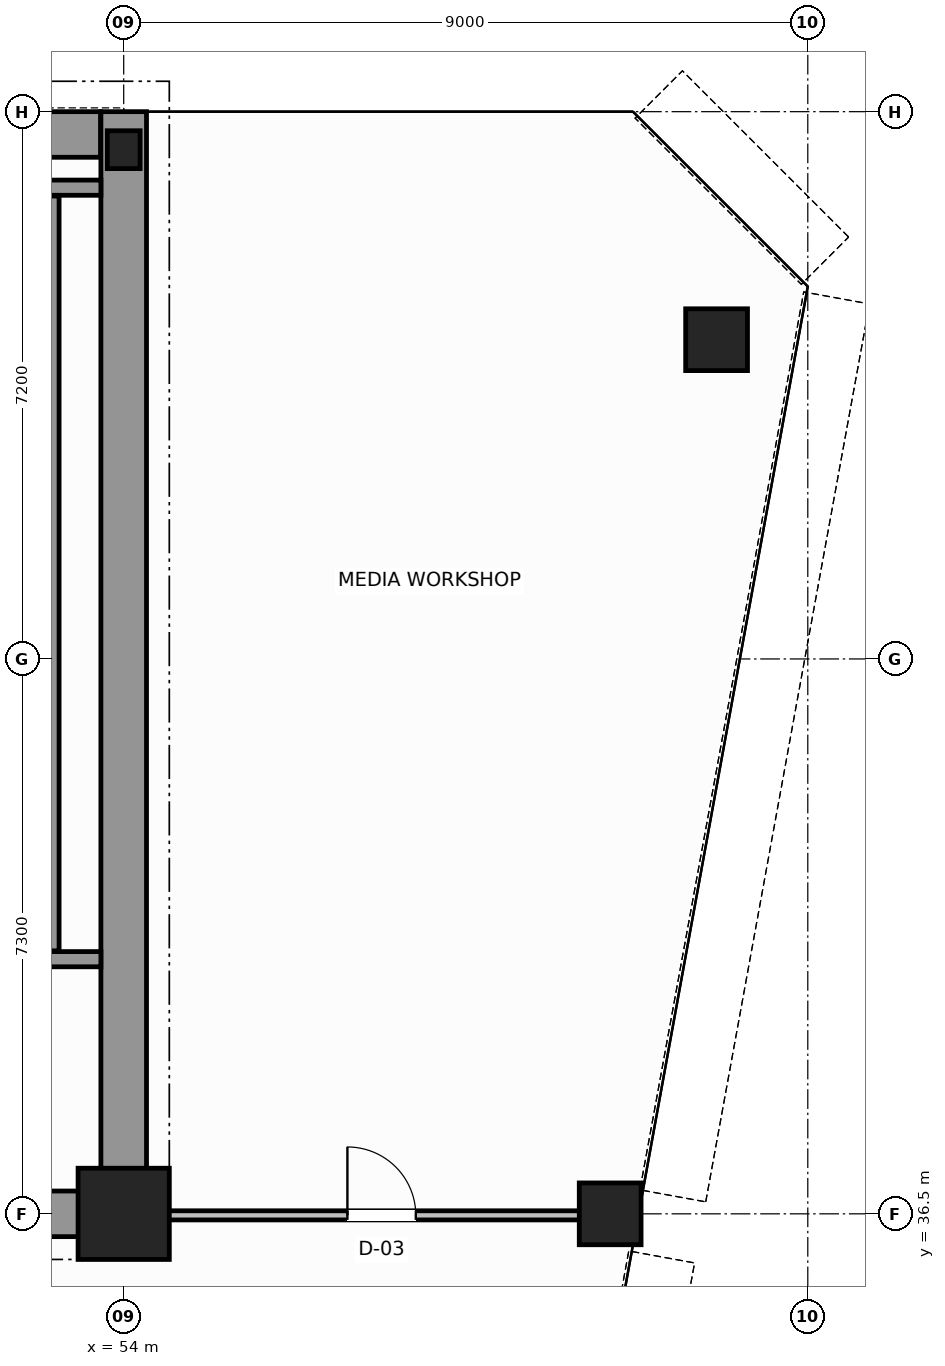
"""IFC4 building model, lengths in metres.
Left out: names, types, materials, properties, quantities, classifications, styles, units other than length and angle.
Written with IfcOpenShell. Run it as: python <this file> out.ifc"""

import sys

from ifc_helpers import new_model, si_unit, direction, frame, frame_2d, origin, origin_2d, place, context, subcontext, project, spatial, rectangle, hollow_circle, i_section, extrude, source, transform, mapped, element, fill, save


model = new_model("IFC4")
c1 = context("Model", 3, precision=1e-05, world=origin(), true_north=direction((0.0, 1.0)))
c2 = subcontext(c1, "Body", "Model", "MODEL_VIEW")
j1 = project(units=[si_unit("LENGTHUNIT", "METRE"), si_unit("PLANEANGLEUNIT", "RADIAN")], contexts=[c1])
p1 = place(None, origin())
s1 = spatial("IfcSite", under=j1, at=p1, CompositionType="ELEMENT")
p2 = place(p1, origin())
s2 = spatial("IfcBuilding", under=s1, at=p2, CompositionType="ELEMENT")
p3 = place(p2, frame((0.0, 0.0, 176.6)))
s3 = spatial("IfcBuildingStorey", under=s2, at=p3, CompositionType="ELEMENT", Elevation=176.6)
m1 = source(origin(), c2, "Body", "SweptSolid", [
    extrude(rectangle(XDim=1.2, YDim=1.2, at=origin_2d()), origin(), (0.0, 0.0, 1.0), 3.8),
])
p4 = place(p3, frame((54.0, 36.5, 0.0), z_axis=(0.0, 0.0, 1.0), x_axis=(1.0, 0.0, 0.0)))
e1 = element("IfcColumn", 1, at=p4, inside=s3, PredefinedType="COLUMN", context=c2, shape_type="MappedRepresentation", body=[
    mapped(m1, transform((0.0, 0.0, 0.0), scale=1.0)),
])
m2 = source(origin(), c2, "Body", "SweptSolid", [
    extrude(i_section(OverallWidth=0.432, OverallDepth=0.498, WebThickness=0.055, FlangeThickness=0.068, FilletRadius=0.015, at=origin_2d()), origin(), (0.0, 0.0, 1.0), 3.8),
])
p5 = place(p3, frame((54.0, 50.5, 0.0), z_axis=(0.0, 0.0, 1.0), x_axis=(1.0, 0.0, 0.0)))
e2 = element("IfcColumn", 2, at=p5, inside=s3, PredefinedType="COLUMN", context=c2, shape_type="MappedRepresentation", body=[
    mapped(m2, transform((0.0, 0.0, 0.0), scale=1.0)),
])
m3 = source(origin(), c2, "Body", "SweptSolid", [
    extrude(hollow_circle(Radius=0.406, WallThickness=0.04, at=origin_2d()), origin(), (0.0, 0.0, 1.0), 3.8),
])
for number, where, z_axis, x_axis in (
    (3, (61.8, 48.0, 0.0), (0.0, 0.0, 1.0), (1.0, 0.0, 0.0)),
    (4, (60.4, 36.5, 0.0), (0.0, 0.0, 1.0), (1.0, 0.0, 0.0)),
):
    element("IfcColumn", number, at=place(p3, frame(where, z_axis=z_axis, x_axis=x_axis)), inside=s3, PredefinedType="COLUMN", context=c2, shape_type="MappedRepresentation", body=[
        mapped(m3, transform((0.0, 0.0, 0.0), scale=1.0)),
    ])
p6 = place(p3, frame((34.002, 50.7, 0.0), z_axis=(0.0, 0.0, 1.0), x_axis=(1.0, 0.0, 0.0)))
e5 = element("IfcWall", 5, at=p6, inside=s3, PredefinedType="SHEAR", context=c2, shape_type="SweptSolid", body=[
    extrude(rectangle(XDim=19.694, YDim=0.6, at=frame_2d((9.847, 0.0))), origin(), (0.0, 0.0, 1.0), 3.8),
])
p7 = place(p3, frame((54.0, 36.5, 0.0), z_axis=(0.0, 0.0, 1.0), x_axis=(0.0, 1.0, 0.0)))
e6 = element("IfcWall", 6, at=p7, inside=s3, PredefinedType="SHEAR", context=c2, shape_type="SweptSolid", body=[
    extrude(rectangle(XDim=14.5, YDim=0.6, at=frame_2d((7.25, 0.0))), origin(), (0.0, 0.0, 1.0), 3.8),
])
p8 = place(p3, frame((49.8, 36.5, 0.0), z_axis=(0.0, 0.0, 1.0), x_axis=(1.0, 0.0, 0.0)))
e7 = element("IfcWall", 7, at=p8, inside=s3, PredefinedType="SHEAR", context=c2, shape_type="SweptSolid", body=[
    extrude(rectangle(XDim=3.88, YDim=0.6, at=frame_2d((1.94, 0.0))), origin(), (0.0, 0.0, 1.0), 2.58),
])
p9 = place(p3, frame((49.4, 39.85, 0.0), z_axis=(0.0, 0.0, 1.0), x_axis=(1.0, 0.0, 0.0)))
e8 = element("IfcWall", 8, at=p9, inside=s3, PredefinedType="SOLIDWALL", context=c2, shape_type="SweptSolid", body=[
    extrude(rectangle(XDim=4.3, YDim=0.2, at=frame_2d((2.15, 0.0))), origin(), (0.0, 0.0, 1.0), 3.8),
])
p10 = place(p9, frame((1.325, 0.0, 0.0)))
e9 = element("IfcOpeningElement", 9, at=p10, cuts=e8, PredefinedType="OPENING", context=c2, shape_type="SweptSolid", body=[
    extrude(rectangle(XDim=1.1, YDim=2.15, at=frame_2d((0.55, 1.075))), frame((0.0, 0.11, 0.0), z_axis=(0.0, -1.0, 0.0), x_axis=(1.0, 0.0, 0.0)), (0.0, 0.0, 1.0), 0.22),
])
p11 = place(p3, frame((49.4, 50.0, 0.0), z_axis=(0.0, 0.0, 1.0), x_axis=(1.0, 0.0, 0.0)))
e10 = element("IfcWall", 10, at=p11, inside=s3, PredefinedType="SOLIDWALL", context=c2, shape_type="SweptSolid", body=[
    extrude(rectangle(XDim=4.3, YDim=0.2, at=frame_2d((2.15, 0.0))), origin(), (0.0, 0.0, 1.0), 3.8),
])
p12 = place(p3, frame((53.05, 39.96, 0.0), z_axis=(0.0, 0.0, 1.0), x_axis=(0.0, 1.0, 0.0)))
e11 = element("IfcWall", 11, at=p12, inside=s3, PredefinedType="SOLIDWALL", context=c2, shape_type="SweptSolid", body=[
    extrude(rectangle(XDim=9.93, YDim=0.2, at=frame_2d((4.965, 0.0))), origin(), (0.0, 0.0, 1.0), 3.8),
])
p13 = place(p3, frame((54.06, 36.48, 0.0), z_axis=(0.0, 0.0, 1.0), x_axis=(1.0, 0.0, 0.0)))
e12 = element("IfcWall", 12, at=p13, inside=s3, PredefinedType="PARTITIONING", context=c2, shape_type="SweptSolid", body=[
    extrude(rectangle(XDim=6.666, YDim=0.12, at=frame_2d((3.333, 0.0))), origin(), (0.0, 0.0, 1.0), 2.37),
])
p14 = place(p13, frame((2.883, 0.0, 0.0)))
e13 = element("IfcOpeningElement", 13, at=p14, cuts=e12, PredefinedType="OPENING", context=c2, shape_type="SweptSolid", body=[
    extrude(rectangle(XDim=0.9, YDim=2.15, at=frame_2d((0.45, 1.075))), frame((0.0, 0.07, 0.0), z_axis=(0.0, -1.0, 0.0), x_axis=(1.0, 0.0, 0.0)), (0.0, 0.0, 1.0), 0.14),
])
m4 = source(origin(), c2, "Body", "SweptSolid", [
    extrude(rectangle(XDim=0.9, YDim=2.15, at=frame_2d((0.45, 1.075))), frame((0.0, 0.025, 0.0), z_axis=(0.0, -1.0, 0.0), x_axis=(1.0, 0.0, 0.0)), (0.0, 0.0, 1.0), 0.05),
])
p15 = place(p14, origin())
e14 = element("IfcDoor", 14, at=p15, inside=s3, OperationType="SINGLE_SWING_RIGHT", PredefinedType="DOOR", context=c2, shape_type="MappedRepresentation", body=[
    mapped(m4, transform((0.0, 0.0, 0.0), scale=1.0)),
])
fill(e13, e14)
save(model, sys.argv[1])
